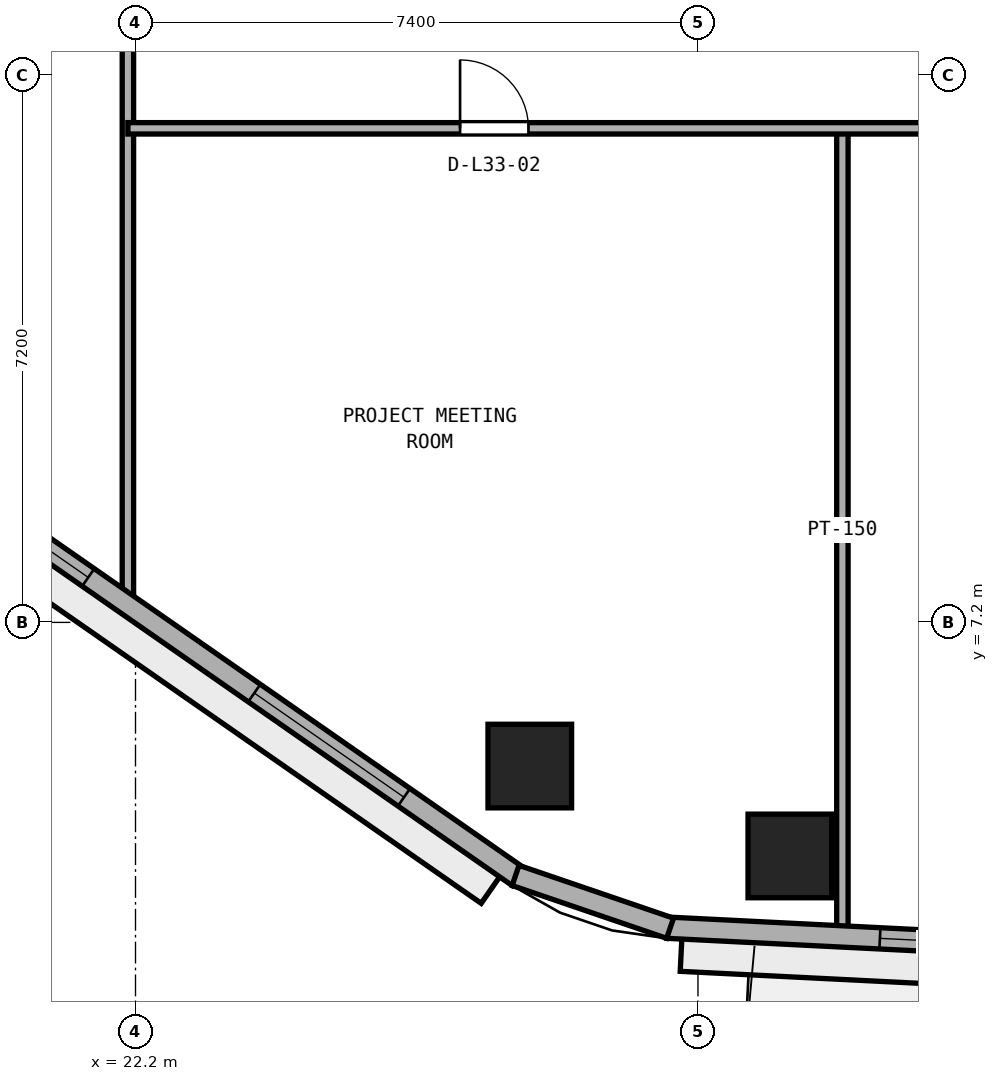
"""IFC4 building model, lengths in metres.
Left out: names, types, materials, properties, quantities, classifications, styles, units other than length and angle.
Written with IfcOpenShell. Run it as: python <this file> out.ifc"""

import sys

from ifc_helpers import new_model, si_unit, direction, frame, frame_2d, origin, origin_2d, place, context, subcontext, project, spatial, rectangle, extrude, element, fill, save


model = new_model("IFC4")
c1 = context("Model", 3, precision=1e-05, world=origin(), true_north=direction((0.0, 1.0)))
c2 = subcontext(c1, "Body", "Model", "MODEL_VIEW")
j1 = project(units=[si_unit("LENGTHUNIT", "METRE"), si_unit("PLANEANGLEUNIT", "RADIAN")], contexts=[c1])
p1 = place(None, origin())
s1 = spatial("IfcSite", under=j1, at=p1, CompositionType="ELEMENT")
p2 = place(p1, origin())
s2 = spatial("IfcBuilding", under=s1, at=p2, CompositionType="ELEMENT")
p3 = place(p2, frame((0.0, 0.0, 132.6)))
s3 = spatial("IfcBuildingStorey", under=s2, at=p3, CompositionType="ELEMENT", Elevation=132.6)
for number, where, z_axis, x_axis in (
    (1, (30.809, 4.127, 0.0), (0.0, 0.0, 1.0), (1.0, 0.0, 0.0)),
    (2, (27.387, 5.31, 0.0), (0.0, 0.0, 1.0), (1.0, 0.0, 0.0)),
):
    element("IfcColumn", number, at=place(p3, frame(where, z_axis=z_axis, x_axis=x_axis)), inside=s3, PredefinedType="COLUMN", context=c2, shape_type="SweptSolid", body=[
        extrude(rectangle(XDim=1.1, YDim=1.1, at=origin_2d()), origin(), (0.0, 0.0, 1.0), 3.8),
    ])
p4 = place(p3, frame((31.5, 3.133, 0.0), z_axis=(0.0, 0.0, 1.0), x_axis=(0.0, 1.0, 0.0)))
e3 = element("IfcWall", 3, at=p4, inside=s3, PredefinedType="PARTITIONING", context=c2, shape_type="SweptSolid", body=[
    extrude(rectangle(XDim=10.567, YDim=0.15, at=frame_2d((5.283, 0.0))), origin(), (0.0, 0.0, 1.0), 3.54),
])
p5 = place(p3, frame((22.1, 7.398, 0.0), z_axis=(0.0, 0.0, 1.0), x_axis=(0.0, 1.0, 0.0)))
e4 = element("IfcWall", 4, at=p5, inside=s3, PredefinedType="PARTITIONING", context=c2, shape_type="SweptSolid", body=[
    extrude(rectangle(XDim=16.452, YDim=0.15, at=frame_2d((8.226, 0.0))), origin(), (0.0, 0.0, 1.0), 3.54),
])
p6 = place(p5, frame((10.807, 0.0, 0.0)))
e5 = element("IfcOpeningElement", 5, at=p6, cuts=e4, PredefinedType="OPENING", context=c2, shape_type="SweptSolid", body=[
    extrude(rectangle(XDim=0.9, YDim=2.1, at=frame_2d((0.45, 1.05))), frame((0.0, 0.085, 0.0), z_axis=(0.0, -1.0, 0.0), x_axis=(1.0, 0.0, 0.0)), (0.0, 0.0, 1.0), 0.17),
])
p7 = place(p3, frame((22.1, 13.7, 0.0), z_axis=(0.0, 0.0, 1.0), x_axis=(1.0, 0.0, 0.0)))
e6 = element("IfcWall", 6, at=p7, inside=s3, PredefinedType="PARTITIONING", context=c2, shape_type="SweptSolid", body=[
    extrude(rectangle(XDim=12.3, YDim=0.15, at=frame_2d((6.15, 0.0))), origin(), (0.0, 0.0, 1.0), 3.54),
])
p8 = place(p7, frame((4.37, 0.0, 0.0)))
e7 = element("IfcOpeningElement", 7, at=p8, cuts=e6, PredefinedType="OPENING", context=c2, shape_type="SweptSolid", body=[
    extrude(rectangle(XDim=0.9, YDim=2.1, at=frame_2d((0.45, 1.05))), frame((0.0, 0.085, 0.0), z_axis=(0.0, -1.0, 0.0), x_axis=(1.0, 0.0, 0.0)), (0.0, 0.0, 1.0), 0.17),
])
p9 = place(p3, frame((29.195, 3.184, 0.0), z_axis=(0.0, 0.0, 1.0), x_axis=(0.998743400978, -0.05011605535, 0.0)))
e8 = element("IfcWall", 8, at=p9, inside=s3, PredefinedType="STANDARD", context=c2, shape_type="SweptSolid", body=[
    extrude(rectangle(XDim=17.333, YDim=0.28, at=frame_2d((8.667, 0.0))), origin(), (0.0, 0.0, 1.0), 3.54),
])
p10 = place(p9, frame((8.116, 0.0, 0.0)))
e9 = element("IfcOpeningElement", 9, at=p10, cuts=e8, PredefinedType="OPENING", context=c2, shape_type="SweptSolid", body=[
    extrude(rectangle(XDim=1.1, YDim=2.2, at=frame_2d((0.55, 1.1))), frame((0.0, 0.15, 0.0), z_axis=(0.0, -1.0, 0.0), x_axis=(1.0, 0.0, 0.0)), (0.0, 0.0, 1.0), 0.3),
])
p11 = place(p9, frame((2.802, 0.0, 0.9)))
e10 = element("IfcOpeningElement", 10, at=p11, cuts=e8, PredefinedType="OPENING", context=c2, shape_type="SweptSolid", body=[
    extrude(rectangle(XDim=2.4, YDim=1.75, at=frame_2d((1.2, 0.875))), frame((0.0, 0.15, 0.0), z_axis=(0.0, -1.0, 0.0), x_axis=(1.0, 0.0, 0.0)), (0.0, 0.0, 1.0), 0.3),
])
p12 = place(p9, frame((12.911, 0.0, 0.9)))
e11 = element("IfcOpeningElement", 11, at=p12, cuts=e8, PredefinedType="OPENING", context=c2, shape_type="SweptSolid", body=[
    extrude(rectangle(XDim=2.4, YDim=1.75, at=frame_2d((1.2, 0.875))), frame((0.0, 0.15, 0.0), z_axis=(0.0, -1.0, 0.0), x_axis=(1.0, 0.0, 0.0)), (0.0, 0.0, 1.0), 0.3),
])
p13 = place(p3, frame((13.952, 13.101, 0.0), z_axis=(0.0, 0.0, 1.0), x_axis=(0.820698239491, -0.571361881558, 0.0)))
e12 = element("IfcWall", 12, at=p13, inside=s3, PredefinedType="STANDARD", context=c2, shape_type="SweptSolid", body=[
    extrude(rectangle(XDim=16.186, YDim=0.28, at=frame_2d((8.093, 0.0))), origin(), (0.0, 0.0, 1.0), 3.54),
])
p14 = place(p13, frame((1.831, 0.0, 0.9)))
e13 = element("IfcOpeningElement", 13, at=p14, cuts=e12, PredefinedType="OPENING", context=c2, shape_type="SweptSolid", body=[
    extrude(rectangle(XDim=2.4, YDim=1.75, at=frame_2d((1.2, 0.875))), frame((0.0, 0.15, 0.0), z_axis=(0.0, -1.0, 0.0), x_axis=(1.0, 0.0, 0.0)), (0.0, 0.0, 1.0), 0.3),
])
p15 = place(p13, frame((6.893, 0.0, 0.9)))
e14 = element("IfcOpeningElement", 14, at=p15, cuts=e12, PredefinedType="OPENING", context=c2, shape_type="SweptSolid", body=[
    extrude(rectangle(XDim=2.4, YDim=1.75, at=frame_2d((1.2, 0.875))), frame((0.0, 0.15, 0.0), z_axis=(0.0, -1.0, 0.0), x_axis=(1.0, 0.0, 0.0)), (0.0, 0.0, 1.0), 0.3),
])
p16 = place(p13, frame((11.955, 0.0, 0.9)))
e15 = element("IfcOpeningElement", 15, at=p16, cuts=e12, PredefinedType="OPENING", context=c2, shape_type="SweptSolid", body=[
    extrude(rectangle(XDim=2.4, YDim=1.75, at=frame_2d((1.2, 0.875))), frame((0.0, 0.15, 0.0), z_axis=(0.0, -1.0, 0.0), x_axis=(1.0, 0.0, 0.0)), (0.0, 0.0, 1.0), 0.3),
])
p17 = place(p3, frame((27.2, 3.871, 0.0), z_axis=(0.0, 0.0, 1.0), x_axis=(0.946327814955, -0.323208395068, 0.0)))
e16 = element("IfcWall", 16, at=p17, inside=s3, PredefinedType="STANDARD", context=c2, shape_type="SweptSolid", body=[
    extrude(rectangle(XDim=2.148, YDim=0.28, at=frame_2d((1.074, 0.0))), origin(), (0.0, 0.0, 1.0), 3.54),
])
p18 = place(p8, origin())
e17 = element("IfcDoor", 17, at=p18, inside=s3, OperationType="SINGLE_SWING_LEFT", PredefinedType="DOOR", context=c2, shape_type="SweptSolid", body=[
    extrude(rectangle(XDim=0.9, YDim=2.1, at=frame_2d((0.45, 1.05))), frame((0.0, 0.025, 0.0), z_axis=(0.0, -1.0, 0.0), x_axis=(1.0, 0.0, 0.0)), (0.0, 0.0, 1.0), 0.05),
])
fill(e7, e17)
p19 = place(p11, origin())
e18 = element("IfcWindow", 18, at=p19, inside=s3, PartitioningType="SINGLE_PANEL", PredefinedType="WINDOW", context=c2, shape_type="SweptSolid", body=[
    extrude(rectangle(XDim=2.4, YDim=1.75, at=frame_2d((1.2, 0.875))), frame((0.0, 0.03, 0.0), z_axis=(0.0, -1.0, 0.0), x_axis=(1.0, 0.0, 0.0)), (0.0, 0.0, 1.0), 0.06),
])
fill(e10, e18)
p20 = place(p15, origin())
e19 = element("IfcWindow", 19, at=p20, inside=s3, PartitioningType="SINGLE_PANEL", PredefinedType="WINDOW", context=c2, shape_type="SweptSolid", body=[
    extrude(rectangle(XDim=2.4, YDim=1.75, at=frame_2d((1.2, 0.875))), frame((0.0, 0.03, 0.0), z_axis=(0.0, -1.0, 0.0), x_axis=(1.0, 0.0, 0.0)), (0.0, 0.0, 1.0), 0.06),
])
fill(e14, e19)
p21 = place(p16, origin())
e20 = element("IfcWindow", 20, at=p21, inside=s3, PartitioningType="SINGLE_PANEL", PredefinedType="WINDOW", context=c2, shape_type="SweptSolid", body=[
    extrude(rectangle(XDim=2.4, YDim=1.75, at=frame_2d((1.2, 0.875))), frame((0.0, 0.03, 0.0), z_axis=(0.0, -1.0, 0.0), x_axis=(1.0, 0.0, 0.0)), (0.0, 0.0, 1.0), 0.06),
])
fill(e15, e20)
save(model, sys.argv[1])
